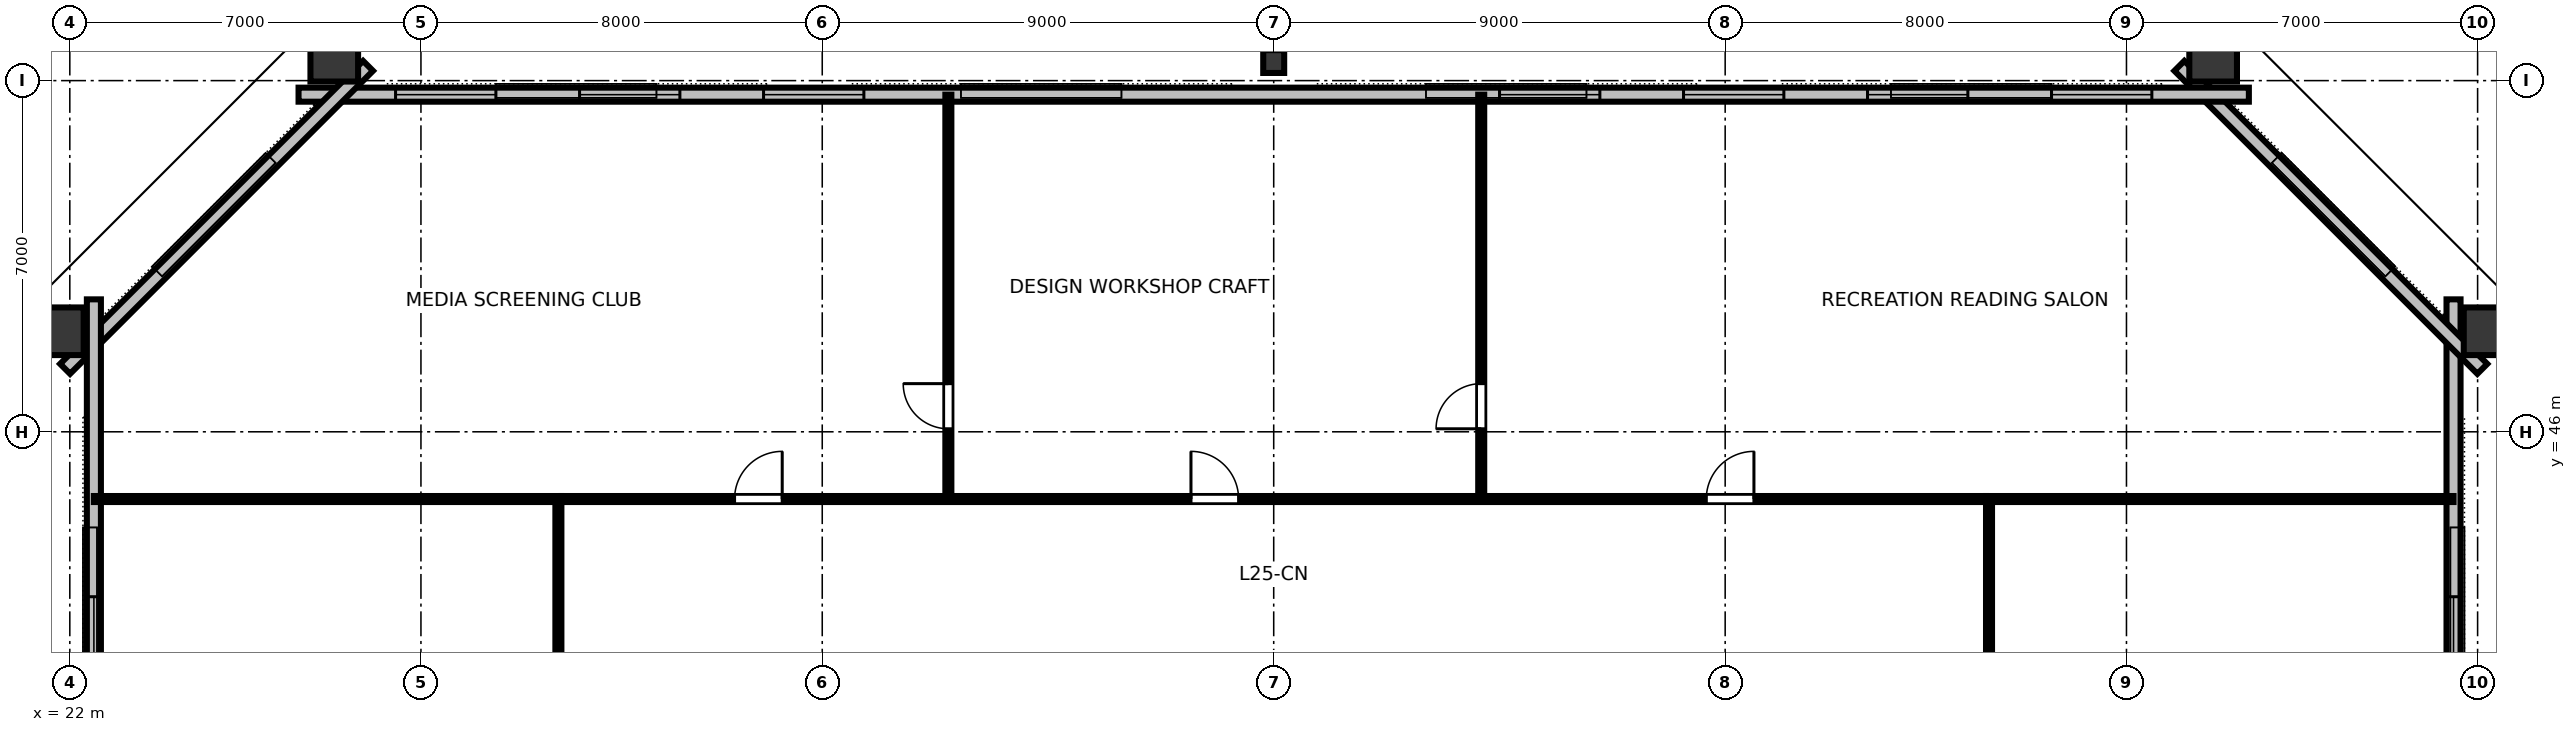
"""IFC4 building model, lengths in metres.
Left out: names, types, materials, properties, quantities, classifications, styles, units other than length and angle.
Written with IfcOpenShell. Run it as: python <this file> out.ifc"""

import sys

from ifc_helpers import new_model, si_unit, direction, frame, frame_2d, origin, origin_2d, place, context, subcontext, project, spatial, rectangle, hollow_rectangle, i_section, extrude, element, fill, save


model = new_model("IFC4")
c1 = context("Model", 3, precision=1e-05, world=origin(), true_north=direction((0.0, 1.0)))
c2 = subcontext(c1, "Body", "Model", "MODEL_VIEW")
j1 = project(units=[si_unit("LENGTHUNIT", "METRE"), si_unit("PLANEANGLEUNIT", "RADIAN")], contexts=[c1])
p1 = place(None, origin())
s1 = spatial("IfcSite", under=j1, at=p1, CompositionType="ELEMENT")
p2 = place(p1, origin())
s2 = spatial("IfcBuilding", under=s1, at=p2, CompositionType="ELEMENT")
p3 = place(p2, frame((0.0, 0.0, 98.8)))
s3 = spatial("IfcBuildingStorey", under=s2, at=p3, CompositionType="ELEMENT", Elevation=98.8)
for number, where, z_axis, x_axis in (
    (1, (70.299, 48.004, 0.0), (0.0, 0.0, 1.0), (0.0, 1.0, 0.0)),
    (2, (64.728, 53.556, 0.0), (0.0, 0.0, 1.0), (1.0, 0.0, 0.0)),
):
    element("IfcColumn", number, at=place(p3, frame(where, z_axis=z_axis, x_axis=x_axis)), inside=s3, PredefinedType="COLUMN", context=c2, shape_type="SweptSolid", body=[
        extrude(hollow_rectangle(XDim=0.95, YDim=1.15, WallThickness=0.06, at=origin_2d()), origin(), (0.0, 0.0, 1.0), 3.358),
    ])
p4 = place(p3, frame((46.0, 53.38, 0.0), z_axis=(0.0, 0.0, 1.0), x_axis=(1.0, 0.0, 0.0)))
e3 = element("IfcColumn", 3, at=p4, inside=s3, PredefinedType="COLUMN", context=c2, shape_type="SweptSolid", body=[
    extrude(i_section(OverallWidth=0.418, OverallDepth=0.455, WebThickness=0.042, FlangeThickness=0.068, FilletRadius=0.025, at=origin_2d()), origin(), (0.0, 0.0, 1.0), 3.358),
])
for number, where, z_axis, x_axis in (
    (4, (27.272, 53.556, 0.0), (0.0, 0.0, 1.0), (1.0, 0.0, 0.0)),
    (5, (21.701, 48.004, 0.0), (0.0, 0.0, 1.0), (0.0, 1.0, 0.0)),
):
    element("IfcColumn", number, at=place(p3, frame(where, z_axis=z_axis, x_axis=x_axis)), inside=s3, PredefinedType="COLUMN", context=c2, shape_type="SweptSolid", body=[
        extrude(hollow_rectangle(XDim=0.95, YDim=1.15, WallThickness=0.06, at=origin_2d()), origin(), (0.0, 0.0, 1.0), 3.358),
    ])
p5 = place(p3, frame((69.52, 15.36, 0.0), z_axis=(0.0, 0.0, 1.0), x_axis=(0.0, 1.0, 0.0)))
e6 = element("IfcWall", 6, at=p5, inside=s3, PredefinedType="STANDARD", context=c2, shape_type="SweptSolid", body=[
    extrude(rectangle(XDim=33.28, YDim=0.28, at=frame_2d((16.64, 0.0))), origin(), (0.0, 0.0, 1.0), 3.36),
])
p6 = place(p5, frame((5.927, 0.0, 0.8)))
e7 = element("IfcOpeningElement", 7, at=p6, cuts=e6, PredefinedType="OPENING", context=c2, shape_type="SweptSolid", body=[
    extrude(rectangle(XDim=2.0, YDim=1.95, at=frame_2d((1.0, 0.975))), frame((0.0, 0.15, 0.0), z_axis=(0.0, -1.0, 0.0), x_axis=(1.0, 0.0, 0.0)), (0.0, 0.0, 1.0), 0.3),
])
p7 = place(p5, frame((9.812, 0.0, 0.8)))
e8 = element("IfcOpeningElement", 8, at=p7, cuts=e6, PredefinedType="OPENING", context=c2, shape_type="SweptSolid", body=[
    extrude(rectangle(XDim=2.0, YDim=1.95, at=frame_2d((1.0, 0.975))), frame((0.0, 0.15, 0.0), z_axis=(0.0, -1.0, 0.0), x_axis=(1.0, 0.0, 0.0)), (0.0, 0.0, 1.0), 0.3),
])
p8 = place(p5, frame((21.468, 0.0, 0.8)))
e9 = element("IfcOpeningElement", 9, at=p8, cuts=e6, PredefinedType="OPENING", context=c2, shape_type="SweptSolid", body=[
    extrude(rectangle(XDim=2.0, YDim=1.95, at=frame_2d((1.0, 0.975))), frame((0.0, 0.15, 0.0), z_axis=(0.0, -1.0, 0.0), x_axis=(1.0, 0.0, 0.0)), (0.0, 0.0, 1.0), 0.3),
])
p9 = place(p5, frame((25.353, 0.0, 0.8)))
e10 = element("IfcOpeningElement", 10, at=p9, cuts=e6, PredefinedType="OPENING", context=c2, shape_type="SweptSolid", body=[
    extrude(rectangle(XDim=2.0, YDim=1.95, at=frame_2d((1.0, 0.975))), frame((0.0, 0.15, 0.0), z_axis=(0.0, -1.0, 0.0), x_axis=(1.0, 0.0, 0.0)), (0.0, 0.0, 1.0), 0.3),
])
p10 = place(p3, frame((70.094, 47.254, 0.0), z_axis=(0.0, 0.0, 1.0), x_axis=(-0.707106781187, 0.707106781187, 0.0)))
e11 = element("IfcWall", 11, at=p10, inside=s3, PredefinedType="STANDARD", context=c2, shape_type="SweptSolid", body=[
    extrude(rectangle(XDim=8.541, YDim=0.28, at=frame_2d((4.271, 0.0))), origin(), (0.0, 0.0, 1.0), 3.36),
])
p11 = place(p3, frame((65.44, 52.72, 0.0), z_axis=(0.0, 0.0, 1.0), x_axis=(-1.0, 0.0, 0.0)))
e12 = element("IfcWall", 12, at=p11, inside=s3, PredefinedType="STANDARD", context=c2, shape_type="SweptSolid", body=[
    extrude(rectangle(XDim=38.88, YDim=0.28, at=frame_2d((19.44, 0.0))), origin(), (0.0, 0.0, 1.0), 3.36),
])
p12 = place(p11, frame((1.934, 0.0, 0.8)))
e13 = element("IfcOpeningElement", 13, at=p12, cuts=e12, PredefinedType="OPENING", context=c2, shape_type="SweptSolid", body=[
    extrude(rectangle(XDim=2.0, YDim=1.95, at=frame_2d((1.0, 0.975))), frame((0.0, 0.15, 0.0), z_axis=(0.0, -1.0, 0.0), x_axis=(1.0, 0.0, 0.0)), (0.0, 0.0, 1.0), 0.3),
])
p13 = place(p11, frame((5.602, 0.0, 0.8)))
e14 = element("IfcOpeningElement", 14, at=p13, cuts=e12, PredefinedType="OPENING", context=c2, shape_type="SweptSolid", body=[
    extrude(rectangle(XDim=2.0, YDim=1.95, at=frame_2d((1.0, 0.975))), frame((0.0, 0.15, 0.0), z_axis=(0.0, -1.0, 0.0), x_axis=(1.0, 0.0, 0.0)), (0.0, 0.0, 1.0), 0.3),
])
p14 = place(p11, frame((9.27, 0.0, 0.8)))
e15 = element("IfcOpeningElement", 15, at=p14, cuts=e12, PredefinedType="OPENING", context=c2, shape_type="SweptSolid", body=[
    extrude(rectangle(XDim=2.0, YDim=1.95, at=frame_2d((1.0, 0.975))), frame((0.0, 0.15, 0.0), z_axis=(0.0, -1.0, 0.0), x_axis=(1.0, 0.0, 0.0)), (0.0, 0.0, 1.0), 0.3),
])
p15 = place(p11, frame((12.938, 0.0, 0.8)))
e16 = element("IfcOpeningElement", 16, at=p15, cuts=e12, PredefinedType="OPENING", context=c2, shape_type="SweptSolid", body=[
    extrude(rectangle(XDim=2.0, YDim=1.95, at=frame_2d((1.0, 0.975))), frame((0.0, 0.15, 0.0), z_axis=(0.0, -1.0, 0.0), x_axis=(1.0, 0.0, 0.0)), (0.0, 0.0, 1.0), 0.3),
])
p16 = place(p11, frame((27.61, 0.0, 0.8)))
e17 = element("IfcOpeningElement", 17, at=p16, cuts=e12, PredefinedType="OPENING", context=c2, shape_type="SweptSolid", body=[
    extrude(rectangle(XDim=2.0, YDim=1.95, at=frame_2d((1.0, 0.975))), frame((0.0, 0.15, 0.0), z_axis=(0.0, -1.0, 0.0), x_axis=(1.0, 0.0, 0.0)), (0.0, 0.0, 1.0), 0.3),
])
p17 = place(p11, frame((31.278, 0.0, 0.8)))
e18 = element("IfcOpeningElement", 18, at=p17, cuts=e12, PredefinedType="OPENING", context=c2, shape_type="SweptSolid", body=[
    extrude(rectangle(XDim=2.0, YDim=1.95, at=frame_2d((1.0, 0.975))), frame((0.0, 0.15, 0.0), z_axis=(0.0, -1.0, 0.0), x_axis=(1.0, 0.0, 0.0)), (0.0, 0.0, 1.0), 0.3),
])
p18 = place(p11, frame((34.946, 0.0, 0.8)))
e19 = element("IfcOpeningElement", 19, at=p18, cuts=e12, PredefinedType="OPENING", context=c2, shape_type="SweptSolid", body=[
    extrude(rectangle(XDim=2.0, YDim=1.95, at=frame_2d((1.0, 0.975))), frame((0.0, 0.15, 0.0), z_axis=(0.0, -1.0, 0.0), x_axis=(1.0, 0.0, 0.0)), (0.0, 0.0, 1.0), 0.3),
])
p19 = place(p3, frame((27.946, 53.294, 0.0), z_axis=(0.0, 0.0, 1.0), x_axis=(-0.707106781187, -0.707106781187, 0.0)))
e20 = element("IfcWall", 20, at=p19, inside=s3, PredefinedType="STANDARD", context=c2, shape_type="SweptSolid", body=[
    extrude(rectangle(XDim=8.541, YDim=0.28, at=frame_2d((4.271, 0.0))), origin(), (0.0, 0.0, 1.0), 3.36),
])
p20 = place(p3, frame((22.48, 48.64, 0.0), z_axis=(0.0, 0.0, 1.0), x_axis=(0.0, -1.0, 0.0)))
e21 = element("IfcWall", 21, at=p20, inside=s3, PredefinedType="STANDARD", context=c2, shape_type="SweptSolid", body=[
    extrude(rectangle(XDim=33.28, YDim=0.28, at=frame_2d((16.64, 0.0))), origin(), (0.0, 0.0, 1.0), 3.36),
])
p21 = place(p20, frame((5.927, 0.0, 0.8)))
e22 = element("IfcOpeningElement", 22, at=p21, cuts=e21, PredefinedType="OPENING", context=c2, shape_type="SweptSolid", body=[
    extrude(rectangle(XDim=2.0, YDim=1.95, at=frame_2d((1.0, 0.975))), frame((0.0, 0.15, 0.0), z_axis=(0.0, -1.0, 0.0), x_axis=(1.0, 0.0, 0.0)), (0.0, 0.0, 1.0), 0.3),
])
p22 = place(p20, frame((9.812, 0.0, 0.8)))
e23 = element("IfcOpeningElement", 23, at=p22, cuts=e21, PredefinedType="OPENING", context=c2, shape_type="SweptSolid", body=[
    extrude(rectangle(XDim=2.0, YDim=1.95, at=frame_2d((1.0, 0.975))), frame((0.0, 0.15, 0.0), z_axis=(0.0, -1.0, 0.0), x_axis=(1.0, 0.0, 0.0)), (0.0, 0.0, 1.0), 0.3),
])
p23 = place(p20, frame((21.468, 0.0, 0.8)))
e24 = element("IfcOpeningElement", 24, at=p23, cuts=e21, PredefinedType="OPENING", context=c2, shape_type="SweptSolid", body=[
    extrude(rectangle(XDim=2.0, YDim=1.95, at=frame_2d((1.0, 0.975))), frame((0.0, 0.15, 0.0), z_axis=(0.0, -1.0, 0.0), x_axis=(1.0, 0.0, 0.0)), (0.0, 0.0, 1.0), 0.3),
])
p24 = place(p20, frame((25.353, 0.0, 0.8)))
e25 = element("IfcOpeningElement", 25, at=p24, cuts=e21, PredefinedType="OPENING", context=c2, shape_type="SweptSolid", body=[
    extrude(rectangle(XDim=2.0, YDim=1.95, at=frame_2d((1.0, 0.975))), frame((0.0, 0.15, 0.0), z_axis=(0.0, -1.0, 0.0), x_axis=(1.0, 0.0, 0.0)), (0.0, 0.0, 1.0), 0.3),
])
p25 = place(p3, frame((39.514, 44.66, 0.0), z_axis=(0.0, 0.0, 1.0), x_axis=(0.0, 1.0, 0.0)))
e26 = element("IfcWall", 26, at=p25, inside=s3, PredefinedType="PARTITIONING", context=c2, shape_type="SweptSolid", body=[
    extrude(rectangle(XDim=8.06, YDim=0.12, at=frame_2d((4.03, 0.0))), origin(), (0.0, 0.0, 1.0), 2.64),
])
p26 = place(p25, frame((1.4, 0.0, 0.0)))
e27 = element("IfcOpeningElement", 27, at=p26, cuts=e26, PredefinedType="OPENING", context=c2, shape_type="SweptSolid", body=[
    extrude(rectangle(XDim=0.9, YDim=2.15, at=frame_2d((0.45, 1.075))), frame((0.0, 0.07, 0.0), z_axis=(0.0, -1.0, 0.0), x_axis=(1.0, 0.0, 0.0)), (0.0, 0.0, 1.0), 0.14),
])
p27 = place(p3, frame((50.137, 44.66, 0.0), z_axis=(0.0, 0.0, 1.0), x_axis=(0.0, 1.0, 0.0)))
e28 = element("IfcWall", 28, at=p27, inside=s3, PredefinedType="PARTITIONING", context=c2, shape_type="SweptSolid", body=[
    extrude(rectangle(XDim=8.06, YDim=0.12, at=frame_2d((4.03, 0.0))), origin(), (0.0, 0.0, 1.0), 2.64),
])
p28 = place(p27, frame((1.4, 0.0, 0.0)))
e29 = element("IfcOpeningElement", 29, at=p28, cuts=e28, PredefinedType="OPENING", context=c2, shape_type="SweptSolid", body=[
    extrude(rectangle(XDim=0.9, YDim=2.15, at=frame_2d((0.45, 1.075))), frame((0.0, 0.07, 0.0), z_axis=(0.0, -1.0, 0.0), x_axis=(1.0, 0.0, 0.0)), (0.0, 0.0, 1.0), 0.14),
])
p29 = place(p3, frame((31.8, 44.66, 0.0), z_axis=(0.0, 0.0, 1.0), x_axis=(1.0, 0.0, 0.0)))
e30 = element("IfcWall", 30, at=p29, inside=s3, PredefinedType="PARTITIONING", context=c2, shape_type="SweptSolid", body=[
    extrude(rectangle(XDim=28.4, YDim=0.12, at=frame_2d((14.2, 0.0))), origin(), (0.0, 0.0, 1.0), 2.64),
])
p30 = place(p29, frame((3.452, 0.0, 0.0)))
e31 = element("IfcOpeningElement", 31, at=p30, cuts=e30, PredefinedType="OPENING", context=c2, shape_type="SweptSolid", body=[
    extrude(rectangle(XDim=0.95, YDim=2.15, at=frame_2d((0.475, 1.075))), frame((0.0, 0.07, 0.0), z_axis=(0.0, -1.0, 0.0), x_axis=(1.0, 0.0, 0.0)), (0.0, 0.0, 1.0), 0.14),
])
p31 = place(p29, frame((12.551, 0.0, 0.0)))
e32 = element("IfcOpeningElement", 32, at=p31, cuts=e30, PredefinedType="OPENING", context=c2, shape_type="SweptSolid", body=[
    extrude(rectangle(XDim=0.95, YDim=2.15, at=frame_2d((0.475, 1.075))), frame((0.0, 0.07, 0.0), z_axis=(0.0, -1.0, 0.0), x_axis=(1.0, 0.0, 0.0)), (0.0, 0.0, 1.0), 0.14),
])
p32 = place(p29, frame((22.823, 0.0, 0.0)))
e33 = element("IfcOpeningElement", 33, at=p32, cuts=e30, PredefinedType="OPENING", context=c2, shape_type="SweptSolid", body=[
    extrude(rectangle(XDim=0.95, YDim=2.15, at=frame_2d((0.475, 1.075))), frame((0.0, 0.07, 0.0), z_axis=(0.0, -1.0, 0.0), x_axis=(1.0, 0.0, 0.0)), (0.0, 0.0, 1.0), 0.14),
])
p33 = place(p3, frame((31.74, 33.02, 0.0), z_axis=(0.0, 0.0, 1.0), x_axis=(0.0, 1.0, 0.0)))
e34 = element("IfcWall", 34, at=p33, inside=s3, PredefinedType="PARTITIONING", context=c2, shape_type="SweptSolid", body=[
    extrude(rectangle(XDim=11.58, YDim=0.12, at=frame_2d((5.79, 0.0))), origin(), (0.0, 0.0, 1.0), 2.64),
])
p34 = place(p33, frame((0.621, 0.0, 0.0)))
e35 = element("IfcOpeningElement", 35, at=p34, cuts=e34, PredefinedType="OPENING", context=c2, shape_type="SweptSolid", body=[
    extrude(rectangle(XDim=0.95, YDim=2.15, at=frame_2d((0.475, 1.075))), frame((0.0, 0.07, 0.0), z_axis=(0.0, -1.0, 0.0), x_axis=(1.0, 0.0, 0.0)), (0.0, 0.0, 1.0), 0.14),
])
p35 = place(p33, frame((6.311, 0.0, 0.0)))
e36 = element("IfcOpeningElement", 36, at=p35, cuts=e34, PredefinedType="OPENING", context=c2, shape_type="SweptSolid", body=[
    extrude(rectangle(XDim=0.95, YDim=2.15, at=frame_2d((0.475, 1.075))), frame((0.0, 0.07, 0.0), z_axis=(0.0, -1.0, 0.0), x_axis=(1.0, 0.0, 0.0)), (0.0, 0.0, 1.0), 0.14),
])
p36 = place(p3, frame((60.26, 33.02, 0.0), z_axis=(0.0, 0.0, 1.0), x_axis=(0.0, 1.0, 0.0)))
e37 = element("IfcWall", 37, at=p36, inside=s3, PredefinedType="PARTITIONING", context=c2, shape_type="SweptSolid", body=[
    extrude(rectangle(XDim=11.58, YDim=0.12, at=frame_2d((5.79, 0.0))), origin(), (0.0, 0.0, 1.0), 2.64),
])
p37 = place(p36, frame((5.215, 0.0, 0.0)))
e38 = element("IfcOpeningElement", 38, at=p37, cuts=e37, PredefinedType="OPENING", context=c2, shape_type="SweptSolid", body=[
    extrude(rectangle(XDim=0.95, YDim=2.15, at=frame_2d((0.475, 1.075))), frame((0.0, 0.07, 0.0), z_axis=(0.0, -1.0, 0.0), x_axis=(1.0, 0.0, 0.0)), (0.0, 0.0, 1.0), 0.14),
])
for number, where, z_axis, x_axis in (
    (39, (31.8, 44.66, 0.0), (0.0, 0.0, 1.0), (-1.0, 0.0, 0.0)),
    (40, (60.2, 44.66, 0.0), (0.0, 0.0, 1.0), (1.0, 0.0, 0.0)),
):
    element("IfcWall", number, at=place(p3, frame(where, z_axis=z_axis, x_axis=x_axis)), inside=s3, PredefinedType="PARTITIONING", context=c2, shape_type="SweptSolid", body=[
        extrude(rectangle(XDim=9.32, YDim=0.12, at=frame_2d((4.66, 0.0))), origin(), (0.0, 0.0, 1.0), 2.64),
    ])
p38 = place(p9, origin())
e41 = element("IfcWindow", 41, at=p38, inside=s3, PartitioningType="SINGLE_PANEL", PredefinedType="WINDOW", context=c2, shape_type="SweptSolid", body=[
    extrude(rectangle(XDim=2.0, YDim=1.95, at=frame_2d((1.0, 0.975))), frame((0.0, 0.03, 0.0), z_axis=(0.0, -1.0, 0.0), x_axis=(1.0, 0.0, 0.0)), (0.0, 0.0, 1.0), 0.06),
])
fill(e10, e41)
p39 = place(p12, origin())
e42 = element("IfcWindow", 42, at=p39, inside=s3, PartitioningType="SINGLE_PANEL", PredefinedType="WINDOW", context=c2, shape_type="SweptSolid", body=[
    extrude(rectangle(XDim=2.0, YDim=1.95, at=frame_2d((1.0, 0.975))), frame((0.0, 0.03, 0.0), z_axis=(0.0, -1.0, 0.0), x_axis=(1.0, 0.0, 0.0)), (0.0, 0.0, 1.0), 0.06),
])
fill(e13, e42)
p40 = place(p13, origin())
e43 = element("IfcWindow", 43, at=p40, inside=s3, PartitioningType="SINGLE_PANEL", PredefinedType="WINDOW", context=c2, shape_type="SweptSolid", body=[
    extrude(rectangle(XDim=2.0, YDim=1.95, at=frame_2d((1.0, 0.975))), frame((0.0, 0.03, 0.0), z_axis=(0.0, -1.0, 0.0), x_axis=(1.0, 0.0, 0.0)), (0.0, 0.0, 1.0), 0.06),
])
fill(e14, e43)
p41 = place(p14, origin())
e44 = element("IfcWindow", 44, at=p41, inside=s3, PartitioningType="SINGLE_PANEL", PredefinedType="WINDOW", context=c2, shape_type="SweptSolid", body=[
    extrude(rectangle(XDim=2.0, YDim=1.95, at=frame_2d((1.0, 0.975))), frame((0.0, 0.03, 0.0), z_axis=(0.0, -1.0, 0.0), x_axis=(1.0, 0.0, 0.0)), (0.0, 0.0, 1.0), 0.06),
])
fill(e15, e44)
p42 = place(p15, origin())
e45 = element("IfcWindow", 45, at=p42, inside=s3, PartitioningType="SINGLE_PANEL", PredefinedType="WINDOW", context=c2, shape_type="SweptSolid", body=[
    extrude(rectangle(XDim=2.0, YDim=1.95, at=frame_2d((1.0, 0.975))), frame((0.0, 0.03, 0.0), z_axis=(0.0, -1.0, 0.0), x_axis=(1.0, 0.0, 0.0)), (0.0, 0.0, 1.0), 0.06),
])
fill(e16, e45)
p43 = place(p16, origin())
e46 = element("IfcWindow", 46, at=p43, inside=s3, PartitioningType="SINGLE_PANEL", PredefinedType="WINDOW", context=c2, shape_type="SweptSolid", body=[
    extrude(rectangle(XDim=2.0, YDim=1.95, at=frame_2d((1.0, 0.975))), frame((0.0, 0.03, 0.0), z_axis=(0.0, -1.0, 0.0), x_axis=(1.0, 0.0, 0.0)), (0.0, 0.0, 1.0), 0.06),
])
fill(e17, e46)
p44 = place(p17, origin())
e47 = element("IfcWindow", 47, at=p44, inside=s3, PartitioningType="SINGLE_PANEL", PredefinedType="WINDOW", context=c2, shape_type="SweptSolid", body=[
    extrude(rectangle(XDim=2.0, YDim=1.95, at=frame_2d((1.0, 0.975))), frame((0.0, 0.03, 0.0), z_axis=(0.0, -1.0, 0.0), x_axis=(1.0, 0.0, 0.0)), (0.0, 0.0, 1.0), 0.06),
])
fill(e18, e47)
p45 = place(p18, origin())
e48 = element("IfcWindow", 48, at=p45, inside=s3, PartitioningType="SINGLE_PANEL", PredefinedType="WINDOW", context=c2, shape_type="SweptSolid", body=[
    extrude(rectangle(XDim=2.0, YDim=1.95, at=frame_2d((1.0, 0.975))), frame((0.0, 0.03, 0.0), z_axis=(0.0, -1.0, 0.0), x_axis=(1.0, 0.0, 0.0)), (0.0, 0.0, 1.0), 0.06),
])
fill(e19, e48)
p46 = place(p21, origin())
e49 = element("IfcWindow", 49, at=p46, inside=s3, PartitioningType="SINGLE_PANEL", PredefinedType="WINDOW", context=c2, shape_type="SweptSolid", body=[
    extrude(rectangle(XDim=2.0, YDim=1.95, at=frame_2d((1.0, 0.975))), frame((0.0, 0.03, 0.0), z_axis=(0.0, -1.0, 0.0), x_axis=(1.0, 0.0, 0.0)), (0.0, 0.0, 1.0), 0.06),
])
fill(e22, e49)
p47 = place(p26, origin())
e50 = element("IfcDoor", 50, at=p47, inside=s3, OperationType="SINGLE_SWING_RIGHT", PredefinedType="DOOR", context=c2, shape_type="SweptSolid", body=[
    extrude(rectangle(XDim=0.9, YDim=2.15, at=frame_2d((0.45, 1.075))), frame((0.0, 0.025, 0.0), z_axis=(0.0, -1.0, 0.0), x_axis=(1.0, 0.0, 0.0)), (0.0, 0.0, 1.0), 0.05),
])
fill(e27, e50)
p48 = place(p28, origin())
e51 = element("IfcDoor", 51, at=p48, inside=s3, OperationType="SINGLE_SWING_LEFT", PredefinedType="DOOR", context=c2, shape_type="SweptSolid", body=[
    extrude(rectangle(XDim=0.9, YDim=2.15, at=frame_2d((0.45, 1.075))), frame((0.0, 0.025, 0.0), z_axis=(0.0, -1.0, 0.0), x_axis=(1.0, 0.0, 0.0)), (0.0, 0.0, 1.0), 0.05),
])
fill(e29, e51)
p49 = place(p30, origin())
e52 = element("IfcDoor", 52, at=p49, inside=s3, OperationType="SINGLE_SWING_RIGHT", PredefinedType="DOOR", context=c2, shape_type="SweptSolid", body=[
    extrude(rectangle(XDim=0.95, YDim=2.15, at=frame_2d((0.475, 1.075))), frame((0.0, 0.025, 0.0), z_axis=(0.0, -1.0, 0.0), x_axis=(1.0, 0.0, 0.0)), (0.0, 0.0, 1.0), 0.05),
])
fill(e31, e52)
p50 = place(p31, origin())
e53 = element("IfcDoor", 53, at=p50, inside=s3, OperationType="SINGLE_SWING_LEFT", PredefinedType="DOOR", context=c2, shape_type="SweptSolid", body=[
    extrude(rectangle(XDim=0.95, YDim=2.15, at=frame_2d((0.475, 1.075))), frame((0.0, 0.025, 0.0), z_axis=(0.0, -1.0, 0.0), x_axis=(1.0, 0.0, 0.0)), (0.0, 0.0, 1.0), 0.05),
])
fill(e32, e53)
p51 = place(p32, origin())
e54 = element("IfcDoor", 54, at=p51, inside=s3, OperationType="SINGLE_SWING_RIGHT", PredefinedType="DOOR", context=c2, shape_type="SweptSolid", body=[
    extrude(rectangle(XDim=0.95, YDim=2.15, at=frame_2d((0.475, 1.075))), frame((0.0, 0.025, 0.0), z_axis=(0.0, -1.0, 0.0), x_axis=(1.0, 0.0, 0.0)), (0.0, 0.0, 1.0), 0.05),
])
fill(e33, e54)
save(model, sys.argv[1])
